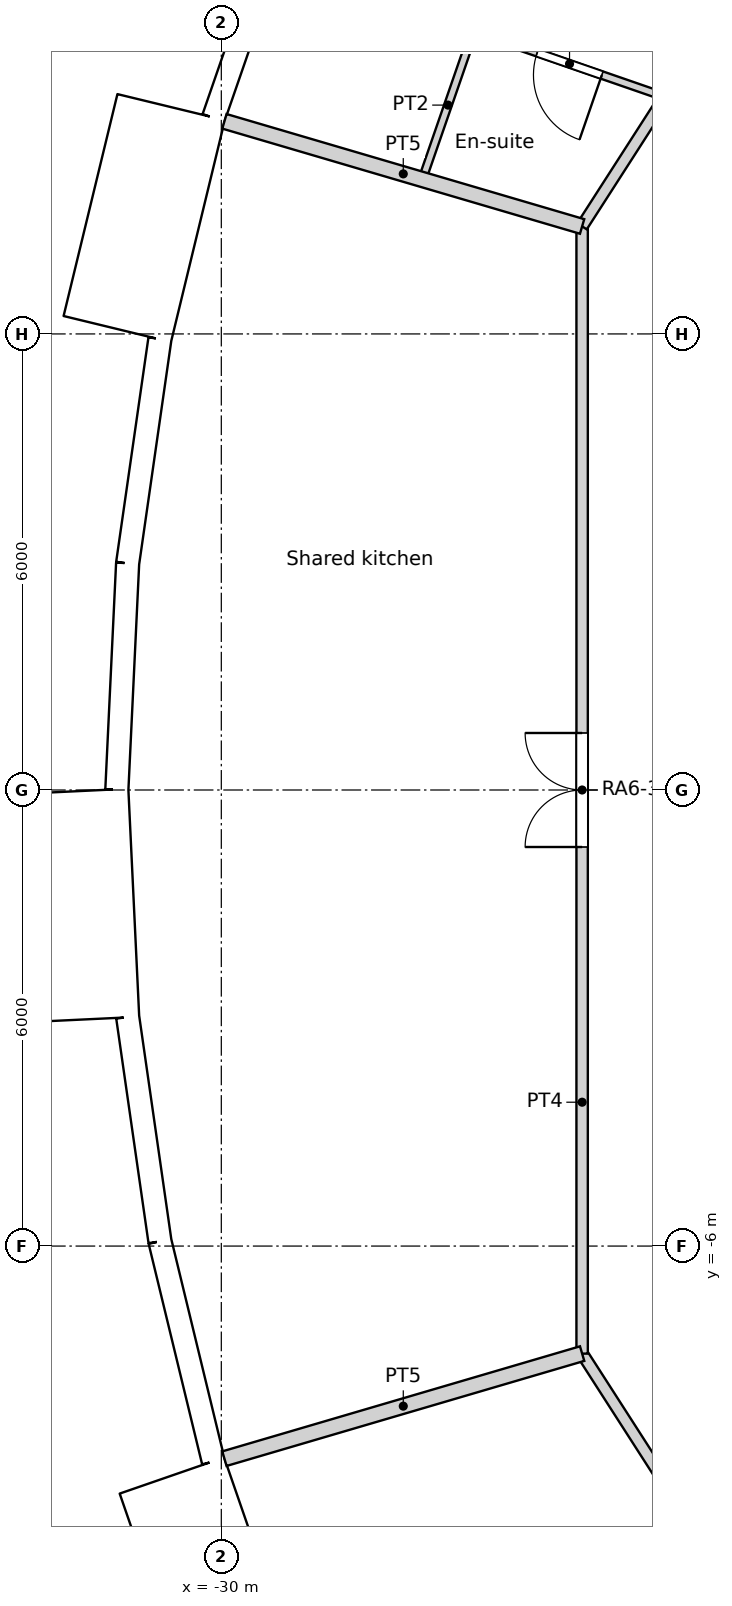
"""IFC4 building model, lengths in metres.
Left out: names, types, materials, properties, quantities, classifications, styles, units other than length and angle.
Written with IfcOpenShell. Run it as: python <this file> out.ifc"""

import sys

from ifc_helpers import new_model, si_unit, direction, frame, frame_2d, origin, origin_2d, place, context, subcontext, project, spatial, rectangle, circle, extrude, element, fill, save


model = new_model("IFC4")
c1 = context("Model", 3, precision=1e-05, world=origin(), true_north=direction((0.0, 1.0)))
c2 = subcontext(c1, "Body", "Model", "MODEL_VIEW")
j1 = project(units=[si_unit("LENGTHUNIT", "METRE"), si_unit("PLANEANGLEUNIT", "RADIAN")], contexts=[c1])
p1 = place(None, origin())
s1 = spatial("IfcSite", under=j1, at=p1, CompositionType="ELEMENT")
p2 = place(p1, origin())
s2 = spatial("IfcBuilding", under=s1, at=p2, CompositionType="ELEMENT")
p3 = place(p2, frame((0.0, 0.0, 82.2)))
s3 = spatial("IfcBuildingStorey", under=s2, at=p3, CompositionType="ELEMENT", Elevation=82.2)
for number, where, z_axis, x_axis in (
    (1, (-29.048, 8.529, 0.0), (0.0, 0.0, 1.0), (1.0, 0.0, 0.0)),
    (2, (-30.137, 2.878, 0.0), (0.0, 0.0, 1.0), (1.0, 0.0, 0.0)),
    (3, (-30.137, -2.878, 0.0), (0.0, 0.0, 1.0), (1.0, 0.0, 0.0)),
    (4, (-29.048, -8.529, 0.0), (0.0, 0.0, 1.0), (1.0, 0.0, 0.0)),
):
    element("IfcColumn", number, at=place(p3, frame(where, z_axis=z_axis, x_axis=x_axis)), inside=s3, PredefinedType="COLUMN", context=c2, shape_type="SweptSolid", body=[
        extrude(circle(Radius=0.6, at=origin_2d()), origin(), (0.0, 0.0, 1.0), 3.6),
    ])
for number, where, z_axis, x_axis in (
    (5, (-24.382, 2.85, 0.0), (0.0, 0.0, 1.0), (1.0, 0.0, 0.0)),
    (6, (-24.382, -2.85, 0.0), (0.0, 0.0, 1.0), (1.0, 0.0, 0.0)),
):
    element("IfcColumn", number, at=place(p3, frame(where, z_axis=z_axis, x_axis=x_axis)), inside=s3, PredefinedType="COLUMN", context=c2, shape_type="SweptSolid", body=[
        extrude(circle(Radius=0.65, at=origin_2d()), origin(), (0.0, 0.0, 1.0), 3.6),
    ])
p4 = place(p3, frame((-29.127, 11.661, 0.0), z_axis=(0.0, 0.0, 1.0), x_axis=(-0.327096492592, -0.944990944154, 0.0)))
e7 = element("IfcWall", 7, at=p4, inside=s3, PredefinedType="SOLIDWALL", context=c2, shape_type="SweptSolid", body=[
    extrude(rectangle(XDim=2.979, YDim=0.3, at=frame_2d((1.49, 0.0))), origin(), (0.0, 0.0, 1.0), 3.15),
])
p5 = place(p4, frame((1.49, 0.0, 1.55)))
e8 = element("IfcOpeningElement", 8, at=p5, cuts=e7, PredefinedType="OPENING", context=c2, shape_type="SweptSolid", body=[
    extrude(circle(Radius=0.9, at=origin_2d()), frame((0.0, 0.16, 0.0), z_axis=(0.0, -1.0, 0.0), x_axis=(1.0, 0.0, 0.0)), (0.0, 0.0, 1.0), 0.32),
])
p6 = place(p3, frame((-30.661, 8.982, -0.45), z_axis=(0.0, 0.0, 1.0), x_axis=(-0.235751415068, -0.971813392732, 0.0)))
e9 = element("IfcWall", 9, at=p6, inside=s3, PredefinedType="ELEMENTEDWALL", context=c2, shape_type="SweptSolid", body=[
    extrude(rectangle(XDim=3.0, YDim=1.45, at=frame_2d((1.5, 0.0))), origin(), (0.0, 0.0, 1.0), 3.6),
])
p7 = place(p6, frame((1.5, 0.0, 2.0)))
e10 = element("IfcOpeningElement", 10, at=p7, cuts=e9, PredefinedType="OPENING", context=c2, shape_type="SweptSolid", body=[
    extrude(circle(Radius=0.9, at=origin_2d()), frame((0.0, 0.735, 0.0), z_axis=(0.0, -1.0, 0.0), x_axis=(1.0, 0.0, 0.0)), (0.0, 0.0, 1.0), 1.47),
])
p8 = place(p3, frame((-30.808, 5.932, 0.0), z_axis=(0.0, 0.0, 1.0), x_axis=(-0.142327539111, -0.989819615693, 0.0)))
e11 = element("IfcWall", 11, at=p8, inside=s3, PredefinedType="SOLIDWALL", context=c2, shape_type="SweptSolid", body=[
    extrude(rectangle(XDim=2.979, YDim=0.3, at=frame_2d((1.49, 0.0))), origin(), (0.0, 0.0, 1.0), 3.15),
])
p9 = place(p8, frame((1.49, 0.0, 1.55)))
e12 = element("IfcOpeningElement", 12, at=p9, cuts=e11, PredefinedType="OPENING", context=c2, shape_type="SweptSolid", body=[
    extrude(circle(Radius=0.9, at=origin_2d()), frame((0.0, 0.16, 0.0), z_axis=(0.0, -1.0, 0.0), x_axis=(1.0, 0.0, 0.0)), (0.0, 0.0, 1.0), 0.32),
])
p10 = place(p3, frame((-31.232, 2.982, 0.0), z_axis=(0.0, 0.0, 1.0), x_axis=(-0.047522328113, -0.998870175914, 0.0)))
e13 = element("IfcWall", 13, at=p10, inside=s3, PredefinedType="SOLIDWALL", context=c2, shape_type="SweptSolid", body=[
    extrude(rectangle(XDim=2.98, YDim=0.3, at=frame_2d((1.49, 0.0))), origin(), (0.0, 0.0, 1.0), 3.15),
])
p11 = place(p10, frame((1.49, 0.0, 1.55)))
e14 = element("IfcOpeningElement", 14, at=p11, cuts=e13, PredefinedType="OPENING", context=c2, shape_type="SweptSolid", body=[
    extrude(circle(Radius=0.9, at=origin_2d()), frame((0.0, 0.16, 0.0), z_axis=(0.0, -1.0, 0.0), x_axis=(1.0, 0.0, 0.0)), (0.0, 0.0, 1.0), 0.32),
])
p12 = place(p3, frame((-31.949, -0.02, -0.45), z_axis=(0.0, 0.0, 1.0), x_axis=(0.047607680889, -0.998866111509, 0.0)))
e15 = element("IfcWall", 15, at=p12, inside=s3, PredefinedType="ELEMENTEDWALL", context=c2, shape_type="SweptSolid", body=[
    extrude(rectangle(XDim=3.0, YDim=1.45, at=frame_2d((1.5, 0.0))), origin(), (0.0, 0.0, 1.0), 3.6),
])
p13 = place(p12, frame((1.5, 0.0, 2.0)))
e16 = element("IfcOpeningElement", 16, at=p13, cuts=e15, PredefinedType="OPENING", context=c2, shape_type="SweptSolid", body=[
    extrude(circle(Radius=0.9, at=origin_2d()), frame((0.0, 0.735, 0.0), z_axis=(0.0, -1.0, 0.0), x_axis=(1.0, 0.0, 0.0)), (0.0, 0.0, 1.0), 1.47),
])
p14 = place(p3, frame((-31.231, -2.988, 0.0), z_axis=(0.0, 0.0, 1.0), x_axis=(0.142315996627, -0.989821275334, 0.0)))
e17 = element("IfcWall", 17, at=p14, inside=s3, PredefinedType="SOLIDWALL", context=c2, shape_type="SweptSolid", body=[
    extrude(rectangle(XDim=2.98, YDim=0.3, at=frame_2d((1.49, 0.0))), origin(), (0.0, 0.0, 1.0), 3.15),
])
p15 = place(p14, frame((1.49, 0.0, 1.55)))
e18 = element("IfcOpeningElement", 18, at=p15, cuts=e17, PredefinedType="OPENING", context=c2, shape_type="SweptSolid", body=[
    extrude(circle(Radius=0.9, at=origin_2d()), frame((0.0, 0.16, 0.0), z_axis=(0.0, -1.0, 0.0), x_axis=(1.0, 0.0, 0.0)), (0.0, 0.0, 1.0), 0.32),
])
p16 = place(p3, frame((-30.807, -5.938, 0.0), z_axis=(0.0, 0.0, 1.0), x_axis=(0.235743081534, -0.971815414319, 0.0)))
e19 = element("IfcWall", 19, at=p16, inside=s3, PredefinedType="SOLIDWALL", context=c2, shape_type="SweptSolid", body=[
    extrude(rectangle(XDim=2.979, YDim=0.3, at=frame_2d((1.49, 0.0))), origin(), (0.0, 0.0, 1.0), 3.15),
])
p17 = place(p16, frame((1.49, 0.0, 1.55)))
e20 = element("IfcOpeningElement", 20, at=p17, cuts=e19, PredefinedType="OPENING", context=c2, shape_type="SweptSolid", body=[
    extrude(circle(Radius=0.9, at=origin_2d()), frame((0.0, 0.16, 0.0), z_axis=(0.0, -1.0, 0.0), x_axis=(1.0, 0.0, 0.0)), (0.0, 0.0, 1.0), 0.32),
])
p18 = place(p3, frame((-30.649, -9.021, -0.45), z_axis=(0.0, 0.0, 1.0), x_axis=(0.327071431777, -0.944999618262, 0.0)))
e21 = element("IfcWall", 21, at=p18, inside=s3, PredefinedType="ELEMENTEDWALL", context=c2, shape_type="SweptSolid", body=[
    extrude(rectangle(XDim=3.0, YDim=1.45, at=frame_2d((1.5, 0.0))), origin(), (0.0, 0.0, 1.0), 3.6),
])
p19 = place(p18, frame((1.5, 0.0, 2.0)))
e22 = element("IfcOpeningElement", 22, at=p19, cuts=e21, PredefinedType="OPENING", context=c2, shape_type="SweptSolid", body=[
    extrude(circle(Radius=0.9, at=origin_2d()), frame((0.0, 0.735, 0.0), z_axis=(0.0, -1.0, 0.0), x_axis=(1.0, 0.0, 0.0)), (0.0, 0.0, 1.0), 1.47),
])
p20 = place(p3, frame((-25.255, 7.416, 0.0), z_axis=(0.0, 0.0, 1.0), x_axis=(0.540805851332, 0.841147449123, 0.0)))
e23 = element("IfcWall", 23, at=p20, inside=s3, PredefinedType="PARTITIONING", context=c2, shape_type="SweptSolid", body=[
    extrude(rectangle(XDim=14.829, YDim=0.15, at=frame_2d((7.415, 0.0))), origin(), (0.0, 0.0, 1.0), 3.15),
])
p21 = place(p20, frame((5.603, 0.0, 0.0)))
e24 = element("IfcOpeningElement", 24, at=p21, cuts=e23, PredefinedType="OPENING", context=c2, shape_type="SweptSolid", body=[
    extrude(rectangle(XDim=1.0, YDim=2.1, at=frame_2d((0.5, 1.05))), frame((0.0, 0.075, 0.0), z_axis=(0.0, -1.0, 0.0), x_axis=(1.0, 0.0, 0.0)), (0.0, 0.0, 1.0), 0.15),
])
p22 = place(p20, frame((3.013, 0.0, 0.0)))
e25 = element("IfcOpeningElement", 25, at=p22, cuts=e23, PredefinedType="OPENING", context=c2, shape_type="SweptSolid", body=[
    extrude(rectangle(XDim=1.0, YDim=2.1, at=frame_2d((0.5, 1.05))), frame((0.0, 0.075, 0.0), z_axis=(0.0, -1.0, 0.0), x_axis=(1.0, 0.0, 0.0)), (0.0, 0.0, 1.0), 0.15),
])
p23 = place(p3, frame((-25.253, -7.415, 0.0), z_axis=(0.0, 0.0, 1.0), x_axis=(0.0, 1.0, 0.0)))
e26 = element("IfcWall", 26, at=p23, inside=s3, PredefinedType="PARTITIONING", context=c2, shape_type="SweptSolid", body=[
    extrude(rectangle(XDim=14.83, YDim=0.15, at=frame_2d((7.415, 0.0))), origin(), (0.0, 0.0, 1.0), 3.15),
])
p24 = place(p23, frame((6.665, 0.0, 0.0)))
e27 = element("IfcOpeningElement", 27, at=p24, cuts=e26, PredefinedType="OPENING", context=c2, shape_type="SweptSolid", body=[
    extrude(rectangle(XDim=1.5, YDim=2.1, at=frame_2d((0.75, 1.05))), frame((0.0, 0.075, 0.0), z_axis=(0.0, -1.0, 0.0), x_axis=(1.0, 0.0, 0.0)), (0.0, 0.0, 1.0), 0.15),
])
p25 = place(p3, frame((-25.253, -7.415, 0.0), z_axis=(0.0, 0.0, 1.0), x_axis=(0.540667724156, -0.841236240337, 0.0)))
e28 = element("IfcWall", 28, at=p25, inside=s3, PredefinedType="PARTITIONING", context=c2, shape_type="SweptSolid", body=[
    extrude(rectangle(XDim=14.83, YDim=0.15, at=frame_2d((7.415, 0.0))), origin(), (0.0, 0.0, 1.0), 3.15),
])
p26 = place(p25, frame((5.602, 0.0, 0.0)))
e29 = element("IfcOpeningElement", 29, at=p26, cuts=e28, PredefinedType="OPENING", context=c2, shape_type="SweptSolid", body=[
    extrude(rectangle(XDim=1.0, YDim=2.1, at=frame_2d((0.5, 1.05))), frame((0.0, 0.075, 0.0), z_axis=(0.0, -1.0, 0.0), x_axis=(1.0, 0.0, 0.0)), (0.0, 0.0, 1.0), 0.15),
])
p27 = place(p3, frame((-26.679, 9.989, 0.0), z_axis=(0.0, 0.0, 1.0), x_axis=(0.945014370431, -0.327028805578, 0.0)))
e30 = element("IfcWall", 30, at=p27, inside=s3, PredefinedType="PARTITIONING", context=c2, shape_type="SweptSolid", body=[
    extrude(rectangle(XDim=2.667, YDim=0.1, at=frame_2d((1.333, 0.0))), origin(), (0.0, 0.0, 1.0), 3.15),
])
p28 = place(p27, frame((0.884, 0.0, 0.0)))
e31 = element("IfcOpeningElement", 31, at=p28, cuts=e30, PredefinedType="OPENING", context=c2, shape_type="SweptSolid", body=[
    extrude(rectangle(XDim=0.9, YDim=2.04, at=frame_2d((0.45, 1.02))), frame((0.0, 0.05, 0.0), z_axis=(0.0, -1.0, 0.0), x_axis=(1.0, 0.0, 0.0)), (0.0, 0.0, 1.0), 0.1),
])
p29 = place(p3, frame((-27.356, 8.032, 0.0), z_axis=(0.0, 0.0, 1.0), x_axis=(0.326924291943, 0.945050531632, 0.0)))
e32 = element("IfcWall", 32, at=p29, inside=s3, PredefinedType="PARTITIONING", context=c2, shape_type="SweptSolid", body=[
    extrude(rectangle(XDim=2.071, YDim=0.1, at=frame_2d((1.035, 0.0))), origin(), (0.0, 0.0, 1.0), 3.15),
])
p30 = place(p3, frame((-29.959, 8.797, 0.0), z_axis=(0.0, 0.0, 1.0), x_axis=(0.95941700717, -0.281991145876, 0.0)))
e33 = element("IfcWall", 33, at=p30, inside=s3, PredefinedType="PARTITIONING", context=c2, shape_type="SweptSolid", body=[
    extrude(rectangle(XDim=4.905, YDim=0.2, at=frame_2d((2.452, 0.0))), origin(), (0.0, 0.0, 1.0), 3.15),
])
p31 = place(p3, frame((-29.959, -8.797, 0.0), z_axis=(0.0, 0.0, 1.0), x_axis=(0.959478767209, 0.281780934902, 0.0)))
e34 = element("IfcWall", 34, at=p31, inside=s3, PredefinedType="PARTITIONING", context=c2, shape_type="SweptSolid", body=[
    extrude(rectangle(XDim=4.905, YDim=0.2, at=frame_2d((2.452, 0.0))), origin(), (0.0, 0.0, 1.0), 3.15),
])
p32 = place(p5, origin())
e35 = element("IfcWindow", 35, at=p32, inside=s3, PartitioningType="SINGLE_PANEL", PredefinedType="WINDOW", context=c2, shape_type="SweptSolid", body=[
    extrude(circle(Radius=0.9, at=origin_2d()), frame((0.0, 0.12, 0.0), z_axis=(0.0, -1.0, 0.0), x_axis=(1.0, 0.0, 0.0)), (0.0, 0.0, 1.0), 0.1),
])
fill(e8, e35)
p33 = place(p7, origin())
e36 = element("IfcWindow", 36, at=p33, inside=s3, PartitioningType="SINGLE_PANEL", PredefinedType="WINDOW", context=c2, shape_type="SweptSolid", body=[
    extrude(circle(Radius=0.9, at=origin_2d()), frame((0.0, 0.695, 0.0), z_axis=(0.0, -1.0, 0.0), x_axis=(1.0, 0.0, 0.0)), (0.0, 0.0, 1.0), 0.1),
])
fill(e10, e36)
p34 = place(p9, origin())
e37 = element("IfcWindow", 37, at=p34, inside=s3, PartitioningType="SINGLE_PANEL", PredefinedType="WINDOW", context=c2, shape_type="SweptSolid", body=[
    extrude(circle(Radius=0.9, at=origin_2d()), frame((0.0, 0.12, 0.0), z_axis=(0.0, -1.0, 0.0), x_axis=(1.0, 0.0, 0.0)), (0.0, 0.0, 1.0), 0.1),
])
fill(e12, e37)
p35 = place(p11, origin())
e38 = element("IfcWindow", 38, at=p35, inside=s3, PartitioningType="SINGLE_PANEL", PredefinedType="WINDOW", context=c2, shape_type="SweptSolid", body=[
    extrude(circle(Radius=0.9, at=origin_2d()), frame((0.0, 0.12, 0.0), z_axis=(0.0, -1.0, 0.0), x_axis=(1.0, 0.0, 0.0)), (0.0, 0.0, 1.0), 0.1),
])
fill(e14, e38)
p36 = place(p13, origin())
e39 = element("IfcWindow", 39, at=p36, inside=s3, PartitioningType="SINGLE_PANEL", PredefinedType="WINDOW", context=c2, shape_type="SweptSolid", body=[
    extrude(circle(Radius=0.9, at=origin_2d()), frame((0.0, 0.695, 0.0), z_axis=(0.0, -1.0, 0.0), x_axis=(1.0, 0.0, 0.0)), (0.0, 0.0, 1.0), 0.1),
])
fill(e16, e39)
p37 = place(p15, origin())
e40 = element("IfcWindow", 40, at=p37, inside=s3, PartitioningType="SINGLE_PANEL", PredefinedType="WINDOW", context=c2, shape_type="SweptSolid", body=[
    extrude(circle(Radius=0.9, at=origin_2d()), frame((0.0, 0.12, 0.0), z_axis=(0.0, -1.0, 0.0), x_axis=(1.0, 0.0, 0.0)), (0.0, 0.0, 1.0), 0.1),
])
fill(e18, e40)
p38 = place(p17, origin())
e41 = element("IfcWindow", 41, at=p38, inside=s3, PartitioningType="SINGLE_PANEL", PredefinedType="WINDOW", context=c2, shape_type="SweptSolid", body=[
    extrude(circle(Radius=0.9, at=origin_2d()), frame((0.0, 0.12, 0.0), z_axis=(0.0, -1.0, 0.0), x_axis=(1.0, 0.0, 0.0)), (0.0, 0.0, 1.0), 0.1),
])
fill(e20, e41)
p39 = place(p19, origin())
e42 = element("IfcWindow", 42, at=p39, inside=s3, PartitioningType="SINGLE_PANEL", PredefinedType="WINDOW", context=c2, shape_type="SweptSolid", body=[
    extrude(circle(Radius=0.9, at=origin_2d()), frame((0.0, 0.695, 0.0), z_axis=(0.0, -1.0, 0.0), x_axis=(1.0, 0.0, 0.0)), (0.0, 0.0, 1.0), 0.1),
])
fill(e22, e42)
p40 = place(p28, origin())
e43 = element("IfcDoor", 43, at=p40, inside=s3, OperationType="SINGLE_SWING_LEFT", PredefinedType="DOOR", context=c2, shape_type="SweptSolid", body=[
    extrude(rectangle(XDim=0.9, YDim=2.04, at=frame_2d((0.45, 1.02))), frame((0.0, 0.025, 0.0), z_axis=(0.0, -1.0, 0.0), x_axis=(1.0, 0.0, 0.0)), (0.0, 0.0, 1.0), 0.05),
])
fill(e31, e43)
p41 = place(p24, origin())
e44 = element("IfcDoor", 44, at=p41, inside=s3, OperationType="DOUBLE_DOOR_SINGLE_SWING", PredefinedType="DOOR", context=c2, shape_type="SweptSolid", body=[
    extrude(rectangle(XDim=1.5, YDim=2.1, at=frame_2d((0.75, 1.05))), frame((0.0, 0.025, 0.0), z_axis=(0.0, -1.0, 0.0), x_axis=(1.0, 0.0, 0.0)), (0.0, 0.0, 1.0), 0.05),
])
fill(e27, e44)
save(model, sys.argv[1])
